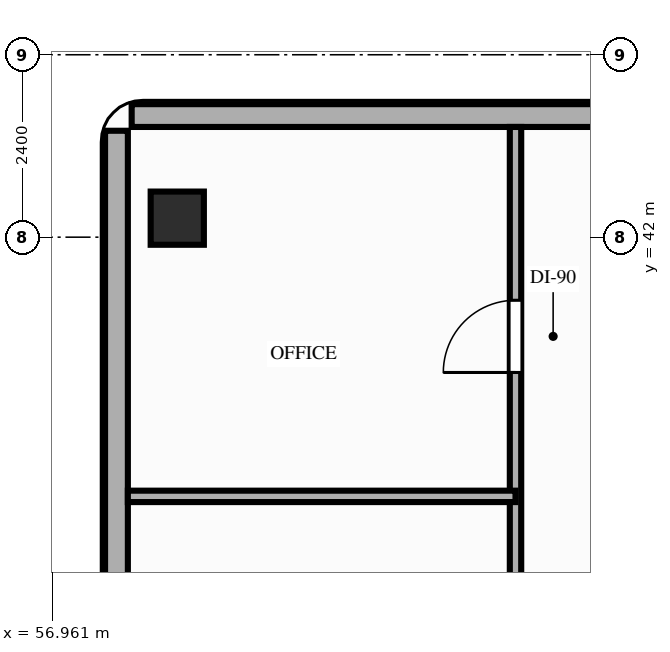
"""IFC4 building model, lengths in metres.
Left out: names, types, materials, properties, quantities, classifications, styles, units other than length and angle.
Written with IfcOpenShell. Run it as: python <this file> out.ifc"""

import sys

from ifc_helpers import new_model, si_unit, direction, frame, frame_2d, origin, origin_2d, place, context, subcontext, project, spatial, rectangle, extrude, element, fill, save


model = new_model("IFC4")
c1 = context("Model", 3, precision=1e-05, world=origin(), true_north=direction((0.0, 1.0)))
c2 = subcontext(c1, "Body", "Model", "MODEL_VIEW")
j1 = project(units=[si_unit("LENGTHUNIT", "METRE"), si_unit("PLANEANGLEUNIT", "RADIAN")], contexts=[c1])
p1 = place(None, origin())
s1 = spatial("IfcSite", under=j1, at=p1, CompositionType="ELEMENT")
p2 = place(p1, origin())
s2 = spatial("IfcBuilding", under=s1, at=p2, CompositionType="ELEMENT")
p3 = place(p2, frame((0.0, 0.0, 93.0)))
s3 = spatial("IfcBuildingStorey", under=s2, at=p3, CompositionType="ELEMENT", Elevation=93.0)
p4 = place(p3, frame((58.6, 42.25, 0.0), z_axis=(0.0, 0.0, 1.0), x_axis=(1.0, 0.0, 0.0)))
e1 = element("IfcColumn", 1, at=p4, inside=s3, PredefinedType="COLUMN", context=c2, shape_type="SweptSolid", body=[
    extrude(rectangle(XDim=0.7, YDim=0.7, at=origin_2d()), origin(), (0.0, 0.0, 1.0), 3.2),
])
p5 = place(p3, frame((57.8, 43.4, 0.0), z_axis=(0.0, 0.0, 1.0), x_axis=(0.0, -1.0, 0.0)))
e2 = element("IfcWall", 2, at=p5, inside=s3, PredefinedType="STANDARD", context=c2, shape_type="SweptSolid", body=[
    extrude(rectangle(XDim=22.6, YDim=0.3, at=frame_2d((11.3, 0.0))), origin(), (0.0, 0.0, 1.0), 2.73),
])
p6 = place(p3, frame((72.8, 43.6, 0.0), z_axis=(0.0, 0.0, 1.0), x_axis=(-1.0, 0.0, 0.0)))
e3 = element("IfcWall", 3, at=p6, inside=s3, PredefinedType="STANDARD", context=c2, shape_type="SweptSolid", body=[
    extrude(rectangle(XDim=14.8, YDim=0.3, at=frame_2d((7.4, 0.0))), origin(), (0.0, 0.0, 1.0), 3.02),
])
p7 = place(p3, frame((63.05, 20.75, 0.0), z_axis=(0.0, 0.0, 1.0), x_axis=(0.0, 1.0, 0.0)))
e4 = element("IfcWall", 4, at=p7, inside=s3, PredefinedType="PARTITIONING", context=c2, shape_type="SweptSolid", body=[
    extrude(rectangle(XDim=22.7, YDim=0.15, at=frame_2d((11.35, 0.0))), origin(), (0.0, 0.0, 1.0), 2.6),
])
p8 = place(p7, frame((0.73, 0.0, 0.0)))
e5 = element("IfcOpeningElement", 5, at=p8, cuts=e4, PredefinedType="OPENING", context=c2, shape_type="SweptSolid", body=[
    extrude(rectangle(XDim=0.85, YDim=2.1, at=frame_2d((0.425, 1.05))), frame((0.0, 0.085, 0.0), z_axis=(0.0, -1.0, 0.0), x_axis=(1.0, 0.0, 0.0)), (0.0, 0.0, 1.0), 0.17),
])
p9 = place(p7, frame((3.43, 0.0, 0.0)))
e6 = element("IfcOpeningElement", 6, at=p9, cuts=e4, PredefinedType="OPENING", context=c2, shape_type="SweptSolid", body=[
    extrude(rectangle(XDim=0.95, YDim=2.1, at=frame_2d((0.475, 1.05))), frame((0.0, 0.085, 0.0), z_axis=(0.0, -1.0, 0.0), x_axis=(1.0, 0.0, 0.0)), (0.0, 0.0, 1.0), 0.17),
])
p10 = place(p7, frame((8.15, 0.0, 0.0)))
e7 = element("IfcOpeningElement", 7, at=p10, cuts=e4, PredefinedType="OPENING", context=c2, shape_type="SweptSolid", body=[
    extrude(rectangle(XDim=0.95, YDim=2.15, at=frame_2d((0.475, 1.075))), frame((0.0, 0.085, 0.0), z_axis=(0.0, -1.0, 0.0), x_axis=(1.0, 0.0, 0.0)), (0.0, 0.0, 1.0), 0.17),
])
p11 = place(p7, frame((13.67, 0.0, 0.0)))
e8 = element("IfcOpeningElement", 8, at=p11, cuts=e4, PredefinedType="OPENING", context=c2, shape_type="SweptSolid", body=[
    extrude(rectangle(XDim=0.95, YDim=2.15, at=frame_2d((0.475, 1.075))), frame((0.0, 0.085, 0.0), z_axis=(0.0, -1.0, 0.0), x_axis=(1.0, 0.0, 0.0)), (0.0, 0.0, 1.0), 0.17),
])
p12 = place(p7, frame((19.47, 0.0, 0.0)))
e9 = element("IfcOpeningElement", 9, at=p12, cuts=e4, PredefinedType="OPENING", context=c2, shape_type="SweptSolid", body=[
    extrude(rectangle(XDim=0.95, YDim=2.15, at=frame_2d((0.475, 1.075))), frame((0.0, 0.085, 0.0), z_axis=(0.0, -1.0, 0.0), x_axis=(1.0, 0.0, 0.0)), (0.0, 0.0, 1.0), 0.17),
])
p13 = place(p3, frame((57.95, 38.59, 0.0), z_axis=(0.0, 0.0, 1.0), x_axis=(1.0, 0.0, 0.0)))
e10 = element("IfcWall", 10, at=p13, inside=s3, PredefinedType="PARTITIONING", context=c2, shape_type="SweptSolid", body=[
    extrude(rectangle(XDim=5.1, YDim=0.15, at=frame_2d((2.55, 0.0))), origin(), (0.0, 0.0, 1.0), 2.6),
])
p14 = place(p12, origin())
e11 = element("IfcDoor", 11, at=p14, inside=s3, OperationType="SINGLE_SWING_LEFT", PredefinedType="DOOR", context=c2, shape_type="SweptSolid", body=[
    extrude(rectangle(XDim=0.95, YDim=2.15, at=frame_2d((0.475, 1.075))), frame((0.0, 0.025, 0.0), z_axis=(0.0, -1.0, 0.0), x_axis=(1.0, 0.0, 0.0)), (0.0, 0.0, 1.0), 0.05),
])
fill(e9, e11)
save(model, sys.argv[1])
